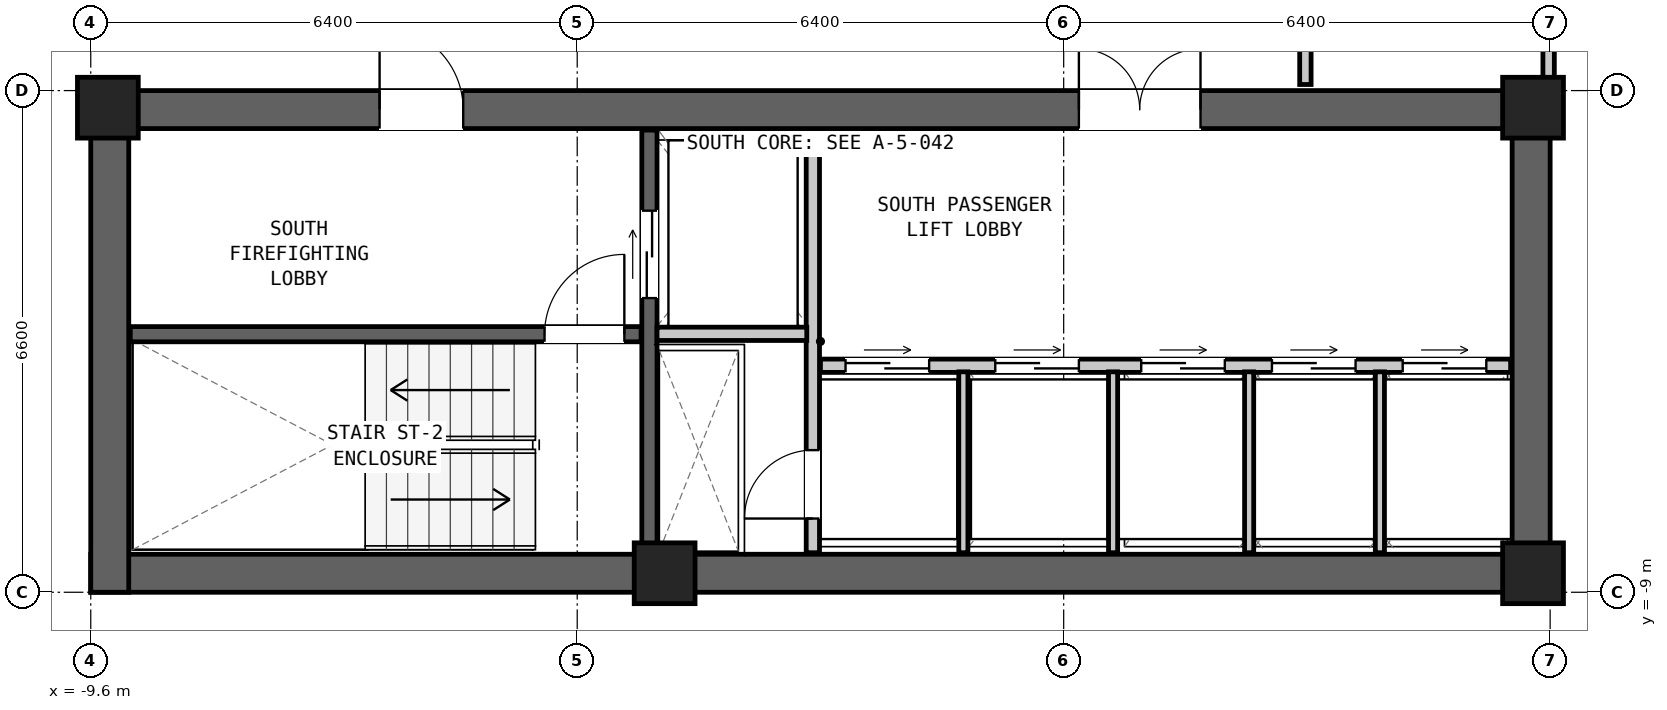
"""IFC4 building model, lengths in metres.
Left out: names, types, materials, properties, quantities, classifications, styles, units other than length and angle.
Written with IfcOpenShell. Run it as: python <this file> out.ifc"""

import sys

from ifc_helpers import new_model, si_unit, direction, frame, frame_2d, origin, origin_2d, place, context, subcontext, project, spatial, rectangle, extrude, element, fill, save


model = new_model("IFC4")
c1 = context("Model", 3, precision=1e-05, world=origin(), true_north=direction((0.0, 1.0)))
c2 = subcontext(c1, "Body", "Model", "MODEL_VIEW")
j1 = project(units=[si_unit("LENGTHUNIT", "METRE"), si_unit("PLANEANGLEUNIT", "RADIAN")], contexts=[c1])
p1 = place(None, origin())
s1 = spatial("IfcSite", under=j1, at=p1, CompositionType="ELEMENT")
p2 = place(p1, origin())
s2 = spatial("IfcBuilding", under=s1, at=p2, CompositionType="ELEMENT")
p3 = place(p2, frame((0.0, 0.0, 134.15)))
s3 = spatial("IfcBuildingStorey", under=s2, at=p3, CompositionType="ELEMENT", Elevation=134.15)
p4 = place(p3, frame((-9.6, -8.75, 0.0), z_axis=(0.0, 0.0, 1.0), x_axis=(1.0, 0.0, 0.0)))
e1 = element("IfcWall", 1, at=p4, inside=s3, PredefinedType="SHEAR", context=c2, shape_type="SweptSolid", body=[
    extrude(rectangle(XDim=19.2, YDim=0.5, at=frame_2d((9.6, 0.0))), origin(), (0.0, 0.0, 1.0), 3.05),
])
p5 = place(p3, frame((-9.6, -2.65, 0.0), z_axis=(0.0, 0.0, 1.0), x_axis=(1.0, 0.0, 0.0)))
e2 = element("IfcWall", 2, at=p5, inside=s3, PredefinedType="SHEAR", context=c2, shape_type="SweptSolid", body=[
    extrude(rectangle(XDim=19.2, YDim=0.5, at=frame_2d((9.6, 0.0))), origin(), (0.0, 0.0, 1.0), 3.05),
])
p6 = place(p5, frame((3.8, 0.0, 0.0)))
e3 = element("IfcOpeningElement", 3, at=p6, cuts=e2, PredefinedType="OPENING", context=c2, shape_type="SweptSolid", body=[
    extrude(rectangle(XDim=1.1, YDim=2.08, at=frame_2d((0.55, 1.04))), frame((0.0, 0.262, 0.0), z_axis=(0.0, -1.0, 0.0), x_axis=(1.0, 0.0, 0.0)), (0.0, 0.0, 1.0), 0.524),
])
p7 = place(p5, frame((13.0, 0.0, 0.0)))
e4 = element("IfcOpeningElement", 4, at=p7, cuts=e2, PredefinedType="OPENING", context=c2, shape_type="SweptSolid", body=[
    extrude(rectangle(XDim=1.6, YDim=2.12, at=frame_2d((0.8, 1.06))), frame((0.0, 0.262, 0.0), z_axis=(0.0, -1.0, 0.0), x_axis=(1.0, 0.0, 0.0)), (0.0, 0.0, 1.0), 0.524),
])
for number, where, z_axis, x_axis in (
    (5, (-9.35, -9.0, 0.0), (0.0, 0.0, 1.0), (0.0, 1.0, 0.0)),
    (6, (9.35, -9.0, 0.0), (0.0, 0.0, 1.0), (0.0, 1.0, 0.0)),
):
    element("IfcWall", number, at=place(p3, frame(where, z_axis=z_axis, x_axis=x_axis)), inside=s3, PredefinedType="SHEAR", context=c2, shape_type="SweptSolid", body=[
        extrude(rectangle(XDim=6.6, YDim=0.5, at=frame_2d((3.3, 0.0))), origin(), (0.0, 0.0, 1.0), 3.05),
    ])
for number, where, z_axis, x_axis in (
    (7, (-9.375, -2.625, 0.0), (0.0, 0.0, 1.0), (1.0, 0.0, 0.0)),
    (8, (9.375, -2.625, 0.0), (0.0, 0.0, 1.0), (1.0, 0.0, 0.0)),
    (9, (-2.05, -8.75, 0.0), (0.0, 0.0, 1.0), (1.0, 0.0, 0.0)),
    (10, (9.375, -8.75, 0.0), (0.0, 0.0, 1.0), (1.0, 0.0, 0.0)),
):
    element("IfcColumn", number, at=place(p3, frame(where, z_axis=z_axis, x_axis=x_axis)), inside=s3, PredefinedType="COLUMN", context=c2, shape_type="SweptSolid", body=[
        extrude(rectangle(XDim=0.8, YDim=0.8, at=origin_2d()), origin(), (0.0, 0.0, 1.0), 3.05),
    ])
p8 = place(p3, frame((-9.08, -5.605, 0.0), z_axis=(0.0, 0.0, 1.0), x_axis=(1.0, 0.0, 0.0)))
e11 = element("IfcWall", 11, at=p8, inside=s3, PredefinedType="SHEAR", context=c2, shape_type="SweptSolid", body=[
    extrude(rectangle(XDim=6.72, YDim=0.2, at=frame_2d((3.36, 0.0))), origin(), (0.0, 0.0, 1.0), 2.83),
])
p9 = place(p8, frame((5.45, 0.0, 0.0)))
e12 = element("IfcOpeningElement", 12, at=p9, cuts=e11, PredefinedType="OPENING", context=c2, shape_type="SweptSolid", body=[
    extrude(rectangle(XDim=1.05, YDim=2.08, at=frame_2d((0.525, 1.04))), frame((0.0, 0.112, 0.0), z_axis=(0.0, -1.0, 0.0), x_axis=(1.0, 0.0, 0.0)), (0.0, 0.0, 1.0), 0.224),
])
p10 = place(p3, frame((-2.25, -8.48, 0.0), z_axis=(0.0, 0.0, 1.0), x_axis=(0.0, 1.0, 0.0)))
e13 = element("IfcWall", 13, at=p10, inside=s3, PredefinedType="SHEAR", context=c2, shape_type="SweptSolid", body=[
    extrude(rectangle(XDim=5.56, YDim=0.2, at=frame_2d((2.78, 0.0))), origin(), (0.0, 0.0, 1.0), 2.83),
])
p11 = place(p10, frame((3.35, 0.0, 0.0)))
e14 = element("IfcOpeningElement", 14, at=p11, cuts=e13, PredefinedType="OPENING", context=c2, shape_type="SweptSolid", body=[
    extrude(rectangle(XDim=1.15, YDim=2.08, at=frame_2d((0.575, 1.04))), frame((0.0, 0.112, 0.0), z_axis=(0.0, -1.0, 0.0), x_axis=(1.0, 0.0, 0.0)), (0.0, 0.0, 1.0), 0.224),
])
p12 = place(p3, frame((-0.1, -8.48, 0.0), z_axis=(0.0, 0.0, 1.0), x_axis=(0.0, 1.0, 0.0)))
e15 = element("IfcWall", 15, at=p12, inside=s3, PredefinedType="PARTITIONING", context=c2, shape_type="SweptSolid", body=[
    extrude(rectangle(XDim=5.56, YDim=0.175, at=frame_2d((2.78, 0.0))), origin(), (0.0, 0.0, 1.0), 2.83),
])
p13 = place(p12, frame((0.45, 0.0, 0.0)))
e16 = element("IfcOpeningElement", 16, at=p13, cuts=e15, PredefinedType="OPENING", context=c2, shape_type="SweptSolid", body=[
    extrude(rectangle(XDim=0.9, YDim=2.05, at=frame_2d((0.45, 1.025))), frame((0.0, 0.1, 0.0), z_axis=(0.0, -1.0, 0.0), x_axis=(1.0, 0.0, 0.0)), (0.0, 0.0, 1.0), 0.199),
])
p14 = place(p3, frame((-2.15, -5.6, 0.0), z_axis=(0.0, 0.0, 1.0), x_axis=(1.0, 0.0, 0.0)))
e17 = element("IfcWall", 17, at=p14, inside=s3, PredefinedType="PARTITIONING", context=c2, shape_type="SweptSolid", body=[
    extrude(rectangle(XDim=1.97, YDim=0.175, at=frame_2d((0.985, 0.0))), origin(), (0.0, 0.0, 1.0), 2.83),
])
p15 = place(p3, frame((0.0, -6.02, 0.0), z_axis=(0.0, 0.0, 1.0), x_axis=(1.0, 0.0, 0.0)))
e18 = element("IfcWall", 18, at=p15, inside=s3, PredefinedType="PARTITIONING", context=c2, shape_type="SweptSolid", body=[
    extrude(rectangle(XDim=9.08, YDim=0.175, at=frame_2d((4.54, 0.0))), origin(), (0.0, 0.0, 1.0), 2.83),
])
p16 = place(p15, frame((0.33, 0.0, 0.0)))
e19 = element("IfcOpeningElement", 19, at=p16, cuts=e18, PredefinedType="OPENING", context=c2, shape_type="SweptSolid", body=[
    extrude(rectangle(XDim=1.1, YDim=2.06, at=frame_2d((0.55, 1.03))), frame((0.0, 0.1, 0.0), z_axis=(0.0, -1.0, 0.0), x_axis=(1.0, 0.0, 0.0)), (0.0, 0.0, 1.0), 0.199),
])
p17 = place(p15, frame((2.3, 0.0, 0.0)))
e20 = element("IfcOpeningElement", 20, at=p17, cuts=e18, PredefinedType="OPENING", context=c2, shape_type="SweptSolid", body=[
    extrude(rectangle(XDim=1.1, YDim=2.06, at=frame_2d((0.55, 1.03))), frame((0.0, 0.1, 0.0), z_axis=(0.0, -1.0, 0.0), x_axis=(1.0, 0.0, 0.0)), (0.0, 0.0, 1.0), 0.199),
])
p18 = place(p15, frame((4.22, 0.0, 0.0)))
e21 = element("IfcOpeningElement", 21, at=p18, cuts=e18, PredefinedType="OPENING", context=c2, shape_type="SweptSolid", body=[
    extrude(rectangle(XDim=1.1, YDim=2.06, at=frame_2d((0.55, 1.03))), frame((0.0, 0.1, 0.0), z_axis=(0.0, -1.0, 0.0), x_axis=(1.0, 0.0, 0.0)), (0.0, 0.0, 1.0), 0.199),
])
p19 = place(p15, frame((5.94, 0.0, 0.0)))
e22 = element("IfcOpeningElement", 22, at=p19, cuts=e18, PredefinedType="OPENING", context=c2, shape_type="SweptSolid", body=[
    extrude(rectangle(XDim=1.1, YDim=2.06, at=frame_2d((0.55, 1.03))), frame((0.0, 0.1, 0.0), z_axis=(0.0, -1.0, 0.0), x_axis=(1.0, 0.0, 0.0)), (0.0, 0.0, 1.0), 0.199),
])
p20 = place(p15, frame((7.66, 0.0, 0.0)))
e23 = element("IfcOpeningElement", 23, at=p20, cuts=e18, PredefinedType="OPENING", context=c2, shape_type="SweptSolid", body=[
    extrude(rectangle(XDim=1.1, YDim=2.06, at=frame_2d((0.55, 1.03))), frame((0.0, 0.1, 0.0), z_axis=(0.0, -1.0, 0.0), x_axis=(1.0, 0.0, 0.0)), (0.0, 0.0, 1.0), 0.199),
])
for number, where, z_axis, x_axis in (
    (24, (1.88, -8.48, 0.0), (0.0, 0.0, 1.0), (0.0, 1.0, 0.0)),
    (25, (3.85, -8.48, 0.0), (0.0, 0.0, 1.0), (0.0, 1.0, 0.0)),
    (26, (5.64, -8.48, 0.0), (0.0, 0.0, 1.0), (0.0, 1.0, 0.0)),
    (27, (7.36, -8.48, 0.0), (0.0, 0.0, 1.0), (0.0, 1.0, 0.0)),
):
    element("IfcWall", number, at=place(p3, frame(where, z_axis=z_axis, x_axis=x_axis)), inside=s3, PredefinedType="PARTITIONING", context=c2, shape_type="SweptSolid", body=[
        extrude(rectangle(XDim=2.38, YDim=0.12, at=frame_2d((1.19, 0.0))), origin(), (0.0, 0.0, 1.0), 2.83),
    ])
p21 = place(p3, frame((6.38, -2.32, 0.0), z_axis=(0.0, 0.0, 1.0), x_axis=(0.0, 1.0, 0.0)))
e28 = element("IfcWall", 28, at=p21, inside=s3, PredefinedType="PARTITIONING", context=c2, shape_type="SweptSolid", body=[
    extrude(rectangle(XDim=5.84, YDim=0.15, at=frame_2d((2.92, 0.0))), origin(), (0.0, 0.0, 1.0), 2.198),
])
p22 = place(p3, frame((9.58, -2.32, 0.0), z_axis=(0.0, 0.0, 1.0), x_axis=(0.0, 1.0, 0.0)))
e29 = element("IfcWall", 29, at=p22, inside=s3, PredefinedType="PARTITIONING", context=c2, shape_type="SweptSolid", body=[
    extrude(rectangle(XDim=5.84, YDim=0.15, at=frame_2d((2.92, 0.0))), origin(), (0.0, 0.0, 1.0), 2.198),
])
p23 = place(p22, frame((2.445, 0.0, 0.0)))
e30 = element("IfcOpeningElement", 30, at=p23, cuts=e29, PredefinedType="OPENING", context=c2, shape_type="SweptSolid", body=[
    extrude(rectangle(XDim=0.95, YDim=2.1, at=frame_2d((0.475, 1.05))), frame((0.0, 0.087, 0.0), z_axis=(0.0, -1.0, 0.0), x_axis=(1.0, 0.0, 0.0)), (0.0, 0.0, 1.0), 0.174),
])
p24 = place(p9, origin())
e31 = element("IfcDoor", 31, at=p24, inside=s3, OperationType="SINGLE_SWING_RIGHT", PredefinedType="DOOR", context=c2, shape_type="SweptSolid", body=[
    extrude(rectangle(XDim=1.05, YDim=2.08, at=frame_2d((0.525, 1.04))), frame((0.0, 0.025, 0.0), z_axis=(0.0, -1.0, 0.0), x_axis=(1.0, 0.0, 0.0)), (0.0, 0.0, 1.0), 0.05),
])
fill(e12, e31)
p25 = place(p6, origin())
e32 = element("IfcDoor", 32, at=p25, inside=s3, OperationType="SINGLE_SWING_LEFT", PredefinedType="DOOR", context=c2, shape_type="SweptSolid", body=[
    extrude(rectangle(XDim=1.1, YDim=2.08, at=frame_2d((0.55, 1.04))), frame((0.0, 0.025, 0.0), z_axis=(0.0, -1.0, 0.0), x_axis=(1.0, 0.0, 0.0)), (0.0, 0.0, 1.0), 0.05),
])
fill(e3, e32)
p26 = place(p11, origin())
e33 = element("IfcDoor", 33, at=p26, inside=s3, OperationType="DOUBLE_DOOR_SLIDING", PredefinedType="DOOR", context=c2, shape_type="SweptSolid", body=[
    extrude(rectangle(XDim=1.15, YDim=2.08, at=frame_2d((0.575, 1.04))), frame((0.0, 0.025, 0.0), z_axis=(0.0, -1.0, 0.0), x_axis=(1.0, 0.0, 0.0)), (0.0, 0.0, 1.0), 0.05),
])
fill(e14, e33)
p27 = place(p13, origin())
e34 = element("IfcDoor", 34, at=p27, inside=s3, OperationType="SINGLE_SWING_LEFT", PredefinedType="DOOR", context=c2, shape_type="SweptSolid", body=[
    extrude(rectangle(XDim=0.9, YDim=2.05, at=frame_2d((0.45, 1.025))), frame((0.0, 0.025, 0.0), z_axis=(0.0, -1.0, 0.0), x_axis=(1.0, 0.0, 0.0)), (0.0, 0.0, 1.0), 0.05),
])
fill(e16, e34)
p28 = place(p16, origin())
e35 = element("IfcDoor", 35, at=p28, inside=s3, OperationType="DOUBLE_DOOR_SLIDING", PredefinedType="DOOR", context=c2, shape_type="SweptSolid", body=[
    extrude(rectangle(XDim=1.1, YDim=2.06, at=frame_2d((0.55, 1.03))), frame((0.0, 0.025, 0.0), z_axis=(0.0, -1.0, 0.0), x_axis=(1.0, 0.0, 0.0)), (0.0, 0.0, 1.0), 0.05),
])
fill(e19, e35)
p29 = place(p17, origin())
e36 = element("IfcDoor", 36, at=p29, inside=s3, OperationType="DOUBLE_DOOR_SLIDING", PredefinedType="DOOR", context=c2, shape_type="SweptSolid", body=[
    extrude(rectangle(XDim=1.1, YDim=2.06, at=frame_2d((0.55, 1.03))), frame((0.0, 0.025, 0.0), z_axis=(0.0, -1.0, 0.0), x_axis=(1.0, 0.0, 0.0)), (0.0, 0.0, 1.0), 0.05),
])
fill(e20, e36)
p30 = place(p7, origin())
e37 = element("IfcDoor", 37, at=p30, inside=s3, OperationType="DOUBLE_DOOR_SINGLE_SWING", PredefinedType="DOOR", context=c2, shape_type="SweptSolid", body=[
    extrude(rectangle(XDim=1.6, YDim=2.12, at=frame_2d((0.8, 1.06))), frame((0.0, 0.025, 0.0), z_axis=(0.0, -1.0, 0.0), x_axis=(1.0, 0.0, 0.0)), (0.0, 0.0, 1.0), 0.05),
])
fill(e4, e37)
p31 = place(p18, origin())
e38 = element("IfcDoor", 38, at=p31, inside=s3, OperationType="DOUBLE_DOOR_SLIDING", PredefinedType="DOOR", context=c2, shape_type="SweptSolid", body=[
    extrude(rectangle(XDim=1.1, YDim=2.06, at=frame_2d((0.55, 1.03))), frame((0.0, 0.025, 0.0), z_axis=(0.0, -1.0, 0.0), x_axis=(1.0, 0.0, 0.0)), (0.0, 0.0, 1.0), 0.05),
])
fill(e21, e38)
p32 = place(p19, origin())
e39 = element("IfcDoor", 39, at=p32, inside=s3, OperationType="DOUBLE_DOOR_SLIDING", PredefinedType="DOOR", context=c2, shape_type="SweptSolid", body=[
    extrude(rectangle(XDim=1.1, YDim=2.06, at=frame_2d((0.55, 1.03))), frame((0.0, 0.025, 0.0), z_axis=(0.0, -1.0, 0.0), x_axis=(1.0, 0.0, 0.0)), (0.0, 0.0, 1.0), 0.05),
])
fill(e22, e39)
p33 = place(p20, origin())
e40 = element("IfcDoor", 40, at=p33, inside=s3, OperationType="DOUBLE_DOOR_SLIDING", PredefinedType="DOOR", context=c2, shape_type="SweptSolid", body=[
    extrude(rectangle(XDim=1.1, YDim=2.06, at=frame_2d((0.55, 1.03))), frame((0.0, 0.025, 0.0), z_axis=(0.0, -1.0, 0.0), x_axis=(1.0, 0.0, 0.0)), (0.0, 0.0, 1.0), 0.05),
])
fill(e23, e40)
save(model, sys.argv[1])
